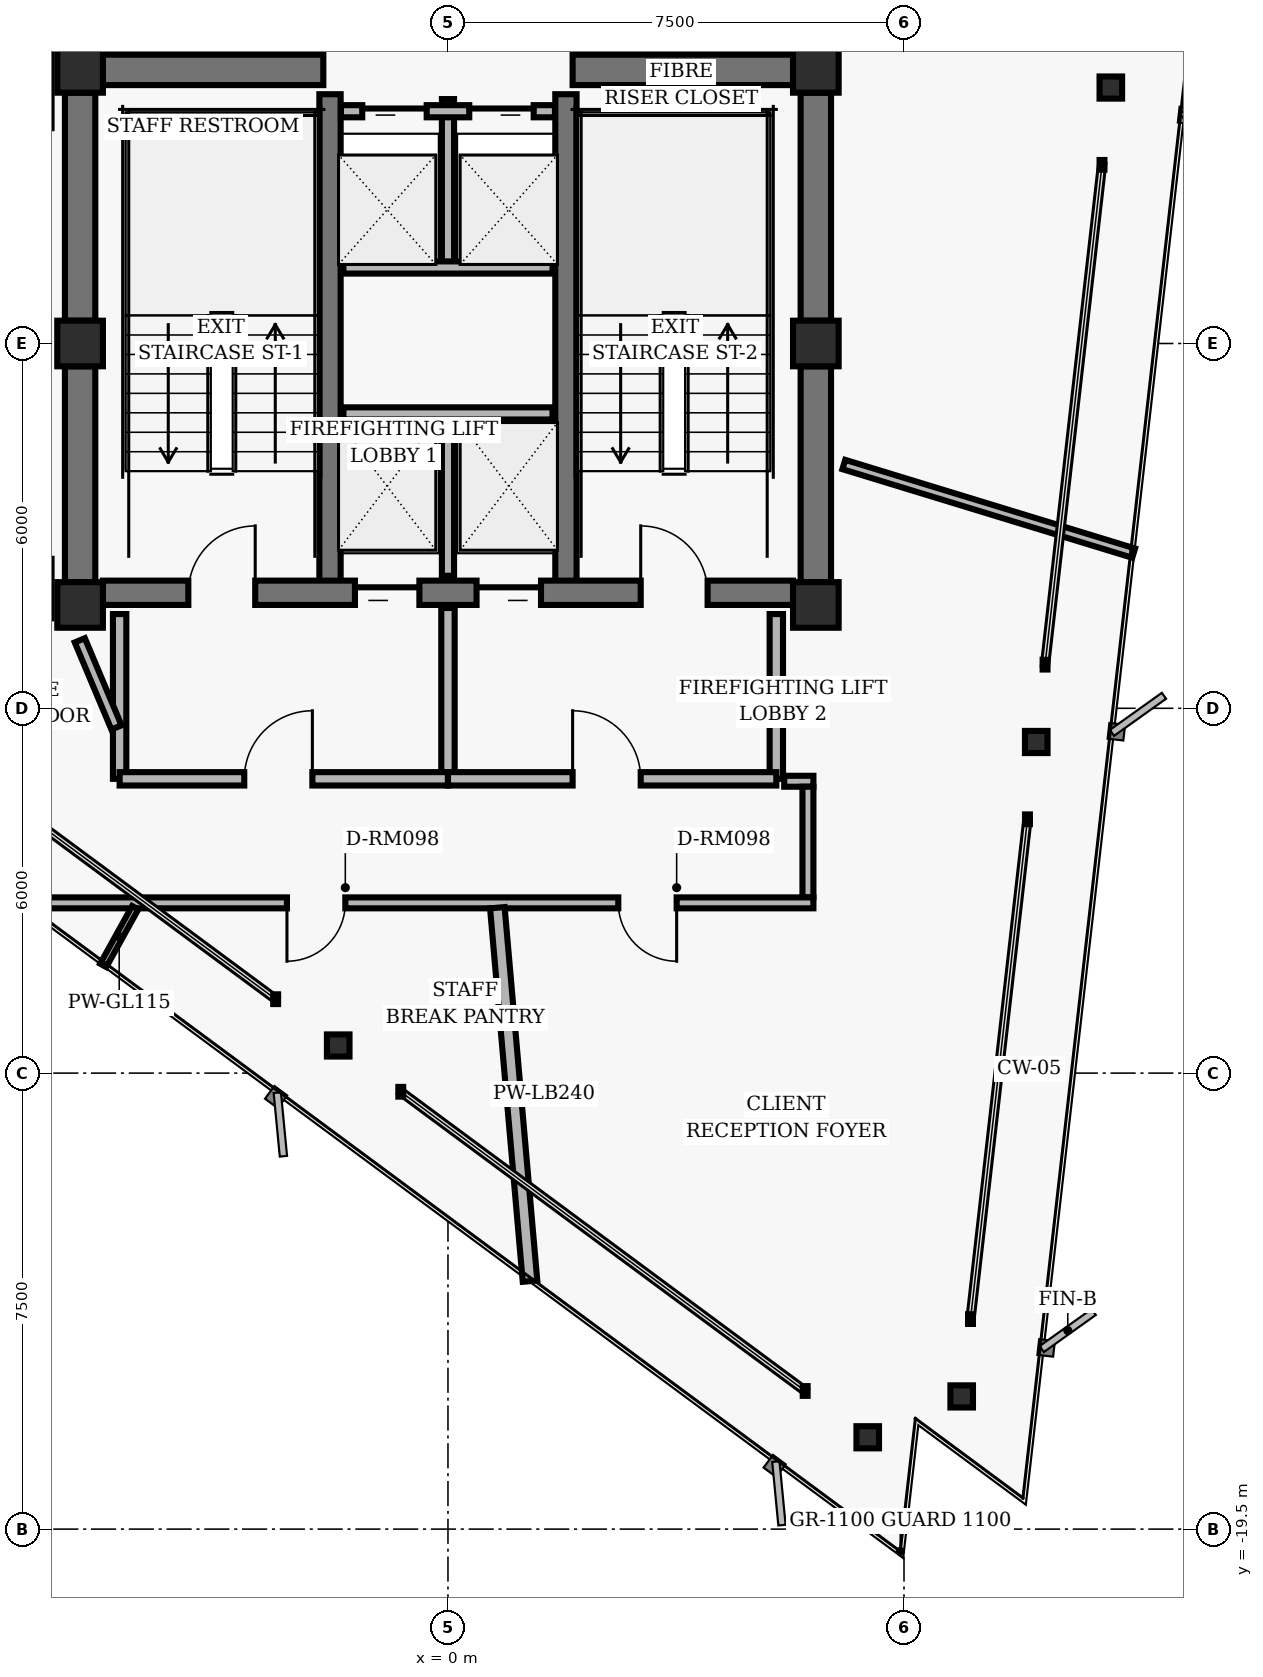
"""IFC4 building model, lengths in metres.
Left out: names, types, materials, properties, quantities, classifications, styles, units other than length and angle.
Written with IfcOpenShell. Run it as: python <this file> out.ifc"""

import sys

from ifc_helpers import new_model, si_unit, direction, frame, frame_2d, origin, origin_2d, place, context, subcontext, project, spatial, rectangle, hollow_rectangle, i_section, extrude, element, fill, save


model = new_model("IFC4")
c1 = context("Model", 3, precision=1e-05, world=origin(), true_north=direction((0.0, 1.0)))
c2 = subcontext(c1, "Body", "Model", "MODEL_VIEW")
j1 = project(units=[si_unit("LENGTHUNIT", "METRE"), si_unit("PLANEANGLEUNIT", "RADIAN")], contexts=[c1])
p1 = place(None, origin())
s1 = spatial("IfcSite", under=j1, at=p1, CompositionType="ELEMENT")
p2 = place(p1, origin())
s2 = spatial("IfcBuilding", under=s1, at=p2, CompositionType="ELEMENT")
p3 = place(p2, frame((0.0, 0.0, 227.04)))
s3 = spatial("IfcBuildingStorey", under=s2, at=p3, CompositionType="ELEMENT", Elevation=227.04)
for number, where, z_axis, x_axis in (
    (1, (-6.05, 4.5, 0.0), (0.0, 0.0, 1.0), (1.0, 0.0, 0.0)),
    (2, (6.05, 4.5, 0.0), (0.0, 0.0, 1.0), (1.0, 0.0, 0.0)),
    (3, (-6.05, 0.0, 0.0), (0.0, 0.0, 1.0), (1.0, 0.0, 0.0)),
    (4, (6.05, 0.0, 0.0), (0.0, 0.0, 1.0), (1.0, 0.0, 0.0)),
    (5, (-6.05, -4.3, 0.0), (0.0, 0.0, 1.0), (1.0, 0.0, 0.0)),
    (6, (6.05, -4.3, 0.0), (0.0, 0.0, 1.0), (1.0, 0.0, 0.0)),
):
    element("IfcColumn", number, at=place(p3, frame(where, z_axis=z_axis, x_axis=x_axis)), inside=s3, PredefinedType="COLUMN", context=c2, shape_type="SweptSolid", body=[
        extrude(hollow_rectangle(XDim=0.75, YDim=0.75, WallThickness=0.05, InnerFilletRadius=0.02, OuterFilletRadius=0.04, at=origin_2d()), origin(), (0.0, 0.0, 1.0), 3.04),
    ])
p4 = place(p3, frame((-6.05, 0.375, 0.0), z_axis=(0.0, 0.0, 1.0), x_axis=(0.0, 1.0, 0.0)))
e7 = element("IfcWall", 7, at=p4, inside=s3, PredefinedType="SHEAR", context=c2, shape_type="SweptSolid", body=[
    extrude(rectangle(XDim=3.75, YDim=0.5, at=frame_2d((1.875, 0.0))), origin(), (0.0, 0.0, 1.0), 2.798),
])
p5 = place(p3, frame((-6.05, -3.925, 0.0), z_axis=(0.0, 0.0, 1.0), x_axis=(0.0, 1.0, 0.0)))
e8 = element("IfcWall", 8, at=p5, inside=s3, PredefinedType="SHEAR", context=c2, shape_type="SweptSolid", body=[
    extrude(rectangle(XDim=3.55, YDim=0.5, at=frame_2d((1.775, 0.0))), origin(), (0.0, 0.0, 1.0), 2.798),
])
p6 = place(p3, frame((6.05, 0.375, 0.0), z_axis=(0.0, 0.0, 1.0), x_axis=(0.0, 1.0, 0.0)))
e9 = element("IfcWall", 9, at=p6, inside=s3, PredefinedType="SHEAR", context=c2, shape_type="SweptSolid", body=[
    extrude(rectangle(XDim=3.75, YDim=0.5, at=frame_2d((1.875, 0.0))), origin(), (0.0, 0.0, 1.0), 2.798),
])
p7 = place(p3, frame((6.05, -3.925, 0.0), z_axis=(0.0, 0.0, 1.0), x_axis=(0.0, 1.0, 0.0)))
e10 = element("IfcWall", 10, at=p7, inside=s3, PredefinedType="SHEAR", context=c2, shape_type="SweptSolid", body=[
    extrude(rectangle(XDim=3.55, YDim=0.5, at=frame_2d((1.775, 0.0))), origin(), (0.0, 0.0, 1.0), 2.798),
])
for number, where, z_axis, x_axis in (
    (11, (-1.94, -4.1, 0.0), (0.0, 0.0, 1.0), (0.0, 1.0, 0.0)),
    (12, (1.94, -4.1, 0.0), (0.0, 0.0, 1.0), (0.0, 1.0, 0.0)),
):
    element("IfcWall", number, at=place(p3, frame(where, z_axis=z_axis, x_axis=x_axis)), inside=s3, PredefinedType="SHEAR", context=c2, shape_type="SweptSolid", body=[
        extrude(rectangle(XDim=8.2, YDim=0.35, at=frame_2d((4.1, 0.0))), origin(), (0.0, 0.0, 1.0), 2.798),
    ])
p8 = place(p3, frame((-5.675, -4.1, 0.0), z_axis=(0.0, 0.0, 1.0), x_axis=(1.0, 0.0, 0.0)))
e13 = element("IfcWall", 13, at=p8, inside=s3, PredefinedType="SHEAR", context=c2, shape_type="SweptSolid", body=[
    extrude(rectangle(XDim=11.35, YDim=0.4, at=frame_2d((5.675, 0.0))), origin(), (0.0, 0.0, 1.0), 2.798),
])
p9 = place(p8, frame((1.405, 0.0, 0.0)))
e14 = element("IfcOpeningElement", 14, at=p9, cuts=e13, PredefinedType="OPENING", context=c2, shape_type="SweptSolid", body=[
    extrude(rectangle(XDim=1.1, YDim=2.04, at=frame_2d((0.55, 1.02))), frame((0.0, 0.21, 0.0), z_axis=(0.0, -1.0, 0.0), x_axis=(1.0, 0.0, 0.0)), (0.0, 0.0, 1.0), 0.42),
])
p10 = place(p8, frame((8.845, 0.0, 0.0)))
e15 = element("IfcOpeningElement", 15, at=p10, cuts=e13, PredefinedType="OPENING", context=c2, shape_type="SweptSolid", body=[
    extrude(rectangle(XDim=1.1, YDim=2.04, at=frame_2d((0.55, 1.02))), frame((0.0, 0.21, 0.0), z_axis=(0.0, -1.0, 0.0), x_axis=(1.0, 0.0, 0.0)), (0.0, 0.0, 1.0), 0.42),
])
p11 = place(p8, frame((4.145, 0.0, 0.0)))
e16 = element("IfcOpeningElement", 16, at=p11, cuts=e13, PredefinedType="OPENING", context=c2, shape_type="SweptSolid", body=[
    extrude(rectangle(XDim=1.06, YDim=2.04, at=frame_2d((0.53, 1.02))), frame((0.0, 0.21, 0.0), z_axis=(0.0, -1.0, 0.0), x_axis=(1.0, 0.0, 0.0)), (0.0, 0.0, 1.0), 0.42),
])
p12 = place(p8, frame((6.145, 0.0, 0.0)))
e17 = element("IfcOpeningElement", 17, at=p12, cuts=e13, PredefinedType="OPENING", context=c2, shape_type="SweptSolid", body=[
    extrude(rectangle(XDim=1.06, YDim=2.04, at=frame_2d((0.53, 1.02))), frame((0.0, 0.21, 0.0), z_axis=(0.0, -1.0, 0.0), x_axis=(1.0, 0.0, 0.0)), (0.0, 0.0, 1.0), 0.42),
])
for number, where, z_axis, x_axis in (
    (18, (-5.675, 4.5, 0.0), (0.0, 0.0, 1.0), (1.0, 0.0, 0.0)),
    (19, (2.05, 4.5, 0.0), (0.0, 0.0, 1.0), (1.0, 0.0, 0.0)),
):
    element("IfcWall", number, at=place(p3, frame(where, z_axis=z_axis, x_axis=x_axis)), inside=s3, PredefinedType="SHEAR", context=c2, shape_type="SweptSolid", body=[
        extrude(rectangle(XDim=3.625, YDim=0.5, at=frame_2d((1.812, 0.0))), origin(), (0.0, 0.0, 1.0), 2.798),
    ])
for number, where, z_axis, x_axis in (
    (20, (8.448, -17.318, 0.0), (0.0, 0.0, 1.0), (1.0, 0.0, 0.0)),
    (21, (9.675, -6.554, 0.0), (0.0, 0.0, 1.0), (1.0, 0.0, 0.0)),
    (22, (10.901, 4.21, 0.0), (0.0, 0.0, 1.0), (1.0, 0.0, 0.0)),
    (23, (-1.805, -11.546, 0.0), (0.0, 0.0, 1.0), (1.0, 0.0, 0.0)),
    (24, (6.903, -17.99, 0.0), (0.0, 0.0, 1.0), (1.0, 0.0, 0.0)),
):
    element("IfcColumn", number, at=place(p3, frame(where, z_axis=z_axis, x_axis=x_axis)), inside=s3, PredefinedType="COLUMN", context=c2, shape_type="SweptSolid", body=[
        extrude(i_section(OverallWidth=0.371, OverallDepth=0.364, WebThickness=0.013, FlangeThickness=0.022, FilletRadius=0.015, at=origin_2d()), origin(), (0.0, 0.0, 1.0), 3.04),
    ])
p13 = place(p3, frame((0.0, -3.82, 0.0), z_axis=(0.0, 0.0, 1.0), x_axis=(0.0, 1.0, 0.0)))
e25 = element("IfcWall", 25, at=p13, inside=s3, PredefinedType="PARTITIONING", context=c2, shape_type="SweptSolid", body=[
    extrude(rectangle(XDim=2.67, YDim=0.2, at=frame_2d((1.335, 0.0))), origin(), (0.0, 0.0, 1.0), 2.773),
])
p14 = place(p3, frame((-1.72, -1.15, 0.0), z_axis=(0.0, 0.0, 1.0), x_axis=(1.0, 0.0, 0.0)))
e26 = element("IfcWall", 26, at=p14, inside=s3, PredefinedType="PARTITIONING", context=c2, shape_type="SweptSolid", body=[
    extrude(rectangle(XDim=3.44, YDim=0.2, at=frame_2d((1.72, 0.0))), origin(), (0.0, 0.0, 1.0), 2.773),
])
for number, where, z_axis, x_axis in (
    (27, (-5.4, -7.16, 0.0), (0.0, 0.0, 1.0), (0.0, 1.0, 0.0)),
    (28, (5.4, -7.16, 0.0), (0.0, 0.0, 1.0), (0.0, 1.0, 0.0)),
):
    element("IfcWall", number, at=place(p3, frame(where, z_axis=z_axis, x_axis=x_axis)), inside=s3, PredefinedType="PARTITIONING", context=c2, shape_type="SweptSolid", body=[
        extrude(rectangle(XDim=2.71, YDim=0.22, at=frame_2d((1.355, 0.0))), origin(), (0.0, 0.0, 1.0), 2.773),
    ])
p15 = place(p3, frame((0.0, -7.16, 0.0), z_axis=(0.0, 0.0, 1.0), x_axis=(0.0, 1.0, 0.0)))
e29 = element("IfcWall", 29, at=p15, inside=s3, PredefinedType="PARTITIONING", context=c2, shape_type="SweptSolid", body=[
    extrude(rectangle(XDim=2.81, YDim=0.22, at=frame_2d((1.405, 0.0))), origin(), (0.0, 0.0, 1.0), 2.773),
])
p16 = place(p3, frame((-5.4, -7.16, 0.0), z_axis=(0.0, 0.0, 1.0), x_axis=(1.0, 0.0, 0.0)))
e30 = element("IfcWall", 30, at=p16, inside=s3, PredefinedType="PARTITIONING", context=c2, shape_type="SweptSolid", body=[
    extrude(rectangle(XDim=5.4, YDim=0.22, at=frame_2d((2.7, 0.0))), origin(), (0.0, 0.0, 1.0), 2.395),
])
p17 = place(p16, frame((2.05, 0.0, 0.0)))
e31 = element("IfcOpeningElement", 31, at=p17, cuts=e30, PredefinedType="OPENING", context=c2, shape_type="SweptSolid", body=[
    extrude(rectangle(XDim=1.12, YDim=2.02, at=frame_2d((0.56, 1.01))), frame((0.0, 0.12, 0.0), z_axis=(0.0, -1.0, 0.0), x_axis=(1.0, 0.0, 0.0)), (0.0, 0.0, 1.0), 0.24),
])
p18 = place(p3, frame((0.0, -7.16, 0.0), z_axis=(0.0, 0.0, 1.0), x_axis=(1.0, 0.0, 0.0)))
e32 = element("IfcWall", 32, at=p18, inside=s3, PredefinedType="PARTITIONING", context=c2, shape_type="SweptSolid", body=[
    extrude(rectangle(XDim=5.4, YDim=0.22, at=frame_2d((2.7, 0.0))), origin(), (0.0, 0.0, 1.0), 2.773),
])
p19 = place(p18, frame((2.05, 0.0, 0.0)))
e33 = element("IfcOpeningElement", 33, at=p19, cuts=e32, PredefinedType="OPENING", context=c2, shape_type="SweptSolid", body=[
    extrude(rectangle(XDim=1.12, YDim=2.02, at=frame_2d((0.56, 1.01))), frame((0.0, 0.12, 0.0), z_axis=(0.0, -1.0, 0.0), x_axis=(1.0, 0.0, 0.0)), (0.0, 0.0, 1.0), 0.24),
])
p20 = place(p3, frame((0.0, 1.25, 0.0), z_axis=(0.0, 0.0, 1.0), x_axis=(0.0, 1.0, 0.0)))
e34 = element("IfcWall", 34, at=p20, inside=s3, PredefinedType="PARTITIONING", context=c2, shape_type="SweptSolid", body=[
    extrude(rectangle(XDim=2.77, YDim=0.2, at=frame_2d((1.385, 0.0))), origin(), (0.0, 0.0, 1.0), 2.773),
])
p21 = place(p3, frame((-1.72, 1.25, 0.0), z_axis=(0.0, 0.0, 1.0), x_axis=(1.0, 0.0, 0.0)))
e35 = element("IfcWall", 35, at=p21, inside=s3, PredefinedType="PARTITIONING", context=c2, shape_type="SweptSolid", body=[
    extrude(rectangle(XDim=3.44, YDim=0.2, at=frame_2d((1.72, 0.0))), origin(), (0.0, 0.0, 1.0), 2.773),
])
p22 = place(p3, frame((-1.76, 3.82, 0.0), z_axis=(0.0, 0.0, 1.0), x_axis=(1.0, 0.0, 0.0)))
e36 = element("IfcWall", 36, at=p22, inside=s3, PredefinedType="PARTITIONING", context=c2, shape_type="SweptSolid", body=[
    extrude(rectangle(XDim=3.52, YDim=0.2, at=frame_2d((1.76, 0.0))), origin(), (0.0, 0.0, 1.0), 2.773),
])
p23 = place(p22, frame((0.35, 0.0, 0.0)))
e37 = element("IfcOpeningElement", 37, at=p23, cuts=e36, PredefinedType="OPENING", context=c2, shape_type="SweptSolid", body=[
    extrude(rectangle(XDim=1.06, YDim=2.04, at=frame_2d((0.53, 1.02))), frame((0.0, 0.11, 0.0), z_axis=(0.0, -1.0, 0.0), x_axis=(1.0, 0.0, 0.0)), (0.0, 0.0, 1.0), 0.22),
])
p24 = place(p22, frame((2.11, 0.0, 0.0)))
e38 = element("IfcOpeningElement", 38, at=p24, cuts=e36, PredefinedType="OPENING", context=c2, shape_type="SweptSolid", body=[
    extrude(rectangle(XDim=1.06, YDim=2.04, at=frame_2d((0.53, 1.02))), frame((0.0, 0.11, 0.0), z_axis=(0.0, -1.0, 0.0), x_axis=(1.0, 0.0, 0.0)), (0.0, 0.0, 1.0), 0.22),
])
p25 = place(p3, frame((-6.055, -4.882, 0.0), z_axis=(0.0, 0.0, 1.0), x_axis=(0.387579540458, -0.921836265189, 0.0)))
e39 = element("IfcWall", 39, at=p25, inside=s3, PredefinedType="PARTITIONING", context=c2, shape_type="SweptSolid", body=[
    extrude(rectangle(XDim=1.555, YDim=0.18, at=frame_2d((0.777, 0.0))), origin(), (0.0, 0.0, 1.0), 2.253),
])
p26 = place(p3, frame((5.53, -7.2, 0.0), z_axis=(0.0, 0.0, 1.0), x_axis=(1.0, 0.0, 0.0)))
e40 = element("IfcWall", 40, at=p26, inside=s3, PredefinedType="PARTITIONING", context=c2, shape_type="SweptSolid", body=[
    extrude(rectangle(XDim=0.48, YDim=0.18, at=frame_2d((0.24, 0.0))), origin(), (0.0, 0.0, 1.0), 2.773),
])
p27 = place(p3, frame((5.92, -7.29, 0.0), z_axis=(0.0, 0.0, 1.0), x_axis=(0.0, -1.0, 0.0)))
e41 = element("IfcWall", 41, at=p27, inside=s3, PredefinedType="PARTITIONING", context=c2, shape_type="SweptSolid", body=[
    extrude(rectangle(XDim=1.82, YDim=0.18, at=frame_2d((0.91, 0.0))), origin(), (0.0, 0.0, 1.0), 2.253),
])
p28 = place(p3, frame((6.01, -9.2, 0.0), z_axis=(0.0, 0.0, 1.0), x_axis=(-1.0, 0.0, 0.0)))
e42 = element("IfcWall", 42, at=p28, inside=s3, PredefinedType="PARTITIONING", context=c2, shape_type="SweptSolid", body=[
    extrude(rectangle(XDim=12.84, YDim=0.18, at=frame_2d((6.42, 0.0))), origin(), (0.0, 0.0, 1.0), 2.773),
])
p29 = place(p28, frame((7.698, 0.0, 0.0)))
e43 = element("IfcOpeningElement", 43, at=p29, cuts=e42, PredefinedType="OPENING", context=c2, shape_type="SweptSolid", body=[
    extrude(rectangle(XDim=0.96, YDim=2.02, at=frame_2d((0.48, 1.01))), frame((0.0, 0.1, 0.0), z_axis=(0.0, -1.0, 0.0), x_axis=(1.0, 0.0, 0.0)), (0.0, 0.0, 1.0), 0.2),
])
p30 = place(p28, frame((2.249, 0.0, 0.0)))
e44 = element("IfcOpeningElement", 44, at=p30, cuts=e42, PredefinedType="OPENING", context=c2, shape_type="SweptSolid", body=[
    extrude(rectangle(XDim=0.96, YDim=2.02, at=frame_2d((0.48, 1.01))), frame((0.0, 0.1, 0.0), z_axis=(0.0, -1.0, 0.0), x_axis=(1.0, 0.0, 0.0)), (0.0, 0.0, 1.0), 0.2),
])
p31 = place(p3, frame((-5.144, -9.28, 0.0), z_axis=(0.0, 0.0, 1.0), x_axis=(-0.484725114425, -0.874666544144, 0.0)))
e45 = element("IfcWall", 45, at=p31, inside=s3, PredefinedType="MOVABLE", context=c2, shape_type="SweptSolid", body=[
    extrude(rectangle(XDim=1.084, YDim=0.115, at=frame_2d((0.542, 0.0))), origin(), (0.0, 0.0, 1.0), 2.773),
])
p32 = place(p3, frame((0.812, -9.28, 0.0), z_axis=(0.0, 0.0, 1.0), x_axis=(0.087150741032, -0.996195135673, 0.0)))
e46 = element("IfcWall", 46, at=p32, inside=s3, PredefinedType="PARTITIONING", context=c2, shape_type="SweptSolid", body=[
    extrude(rectangle(XDim=6.166, YDim=0.24, at=frame_2d((3.083, 0.0))), origin(), (0.0, 0.0, 1.0), 2.773),
])
p33 = place(p3, frame((6.51, -1.99, 0.0), z_axis=(0.0, 0.0, 1.0), x_axis=(0.956296423481, -0.292398957653, 0.0)))
e47 = element("IfcWall", 47, at=p33, inside=s3, PredefinedType="PARTITIONING", context=c2, shape_type="SweptSolid", body=[
    extrude(rectangle(XDim=4.985, YDim=0.16, at=frame_2d((2.492, 0.0))), origin(), (0.0, 0.0, 1.0), 2.773),
])
p34 = place(p9, origin())
e48 = element("IfcDoor", 48, at=p34, inside=s3, OperationType="SINGLE_SWING_RIGHT", PredefinedType="DOOR", context=c2, shape_type="SweptSolid", body=[
    extrude(rectangle(XDim=1.1, YDim=2.04, at=frame_2d((0.55, 1.02))), frame((0.0, 0.025, 0.0), z_axis=(0.0, -1.0, 0.0), x_axis=(1.0, 0.0, 0.0)), (0.0, 0.0, 1.0), 0.05),
])
fill(e14, e48)
p35 = place(p10, origin())
e49 = element("IfcDoor", 49, at=p35, inside=s3, OperationType="SINGLE_SWING_LEFT", PredefinedType="DOOR", context=c2, shape_type="SweptSolid", body=[
    extrude(rectangle(XDim=1.1, YDim=2.04, at=frame_2d((0.55, 1.02))), frame((0.0, 0.025, 0.0), z_axis=(0.0, -1.0, 0.0), x_axis=(1.0, 0.0, 0.0)), (0.0, 0.0, 1.0), 0.05),
])
fill(e15, e49)
p36 = place(p11, origin())
e50 = element("IfcDoor", 50, at=p36, inside=s3, OperationType="SLIDING_TO_LEFT", PredefinedType="DOOR", context=c2, shape_type="SweptSolid", body=[
    extrude(rectangle(XDim=1.06, YDim=2.04, at=frame_2d((0.53, 1.02))), frame((0.0, 0.025, 0.0), z_axis=(0.0, -1.0, 0.0), x_axis=(1.0, 0.0, 0.0)), (0.0, 0.0, 1.0), 0.05),
])
fill(e16, e50)
p37 = place(p12, origin())
e51 = element("IfcDoor", 51, at=p37, inside=s3, OperationType="SLIDING_TO_RIGHT", PredefinedType="DOOR", context=c2, shape_type="SweptSolid", body=[
    extrude(rectangle(XDim=1.06, YDim=2.04, at=frame_2d((0.53, 1.02))), frame((0.0, 0.025, 0.0), z_axis=(0.0, -1.0, 0.0), x_axis=(1.0, 0.0, 0.0)), (0.0, 0.0, 1.0), 0.05),
])
fill(e17, e51)
p38 = place(p17, origin())
e52 = element("IfcDoor", 52, at=p38, inside=s3, OperationType="SINGLE_SWING_RIGHT", PredefinedType="DOOR", context=c2, shape_type="SweptSolid", body=[
    extrude(rectangle(XDim=1.12, YDim=2.02, at=frame_2d((0.56, 1.01))), frame((0.0, 0.025, 0.0), z_axis=(0.0, -1.0, 0.0), x_axis=(1.0, 0.0, 0.0)), (0.0, 0.0, 1.0), 0.05),
])
fill(e31, e52)
p39 = place(p19, origin())
e53 = element("IfcDoor", 53, at=p39, inside=s3, OperationType="SINGLE_SWING_LEFT", PredefinedType="DOOR", context=c2, shape_type="SweptSolid", body=[
    extrude(rectangle(XDim=1.12, YDim=2.02, at=frame_2d((0.56, 1.01))), frame((0.0, 0.025, 0.0), z_axis=(0.0, -1.0, 0.0), x_axis=(1.0, 0.0, 0.0)), (0.0, 0.0, 1.0), 0.05),
])
fill(e33, e53)
p40 = place(p23, origin())
e54 = element("IfcDoor", 54, at=p40, inside=s3, OperationType="SLIDING_TO_LEFT", PredefinedType="DOOR", context=c2, shape_type="SweptSolid", body=[
    extrude(rectangle(XDim=1.06, YDim=2.04, at=frame_2d((0.53, 1.02))), frame((0.0, 0.025, 0.0), z_axis=(0.0, -1.0, 0.0), x_axis=(1.0, 0.0, 0.0)), (0.0, 0.0, 1.0), 0.05),
])
fill(e37, e54)
p41 = place(p24, origin())
e55 = element("IfcDoor", 55, at=p41, inside=s3, OperationType="SLIDING_TO_RIGHT", PredefinedType="DOOR", context=c2, shape_type="SweptSolid", body=[
    extrude(rectangle(XDim=1.06, YDim=2.04, at=frame_2d((0.53, 1.02))), frame((0.0, 0.025, 0.0), z_axis=(0.0, -1.0, 0.0), x_axis=(1.0, 0.0, 0.0)), (0.0, 0.0, 1.0), 0.05),
])
fill(e38, e55)
p42 = place(p29, origin())
e56 = element("IfcDoor", 56, at=p42, inside=s3, OperationType="SINGLE_SWING_RIGHT", PredefinedType="DOOR", context=c2, shape_type="SweptSolid", body=[
    extrude(rectangle(XDim=0.96, YDim=2.02, at=frame_2d((0.48, 1.01))), frame((0.0, 0.025, 0.0), z_axis=(0.0, -1.0, 0.0), x_axis=(1.0, 0.0, 0.0)), (0.0, 0.0, 1.0), 0.05),
])
fill(e43, e56)
p43 = place(p30, origin())
e57 = element("IfcDoor", 57, at=p43, inside=s3, OperationType="SINGLE_SWING_LEFT", PredefinedType="DOOR", context=c2, shape_type="SweptSolid", body=[
    extrude(rectangle(XDim=0.96, YDim=2.02, at=frame_2d((0.48, 1.01))), frame((0.0, 0.025, 0.0), z_axis=(0.0, -1.0, 0.0), x_axis=(1.0, 0.0, 0.0)), (0.0, 0.0, 1.0), 0.05),
])
fill(e44, e57)
save(model, sys.argv[1])
